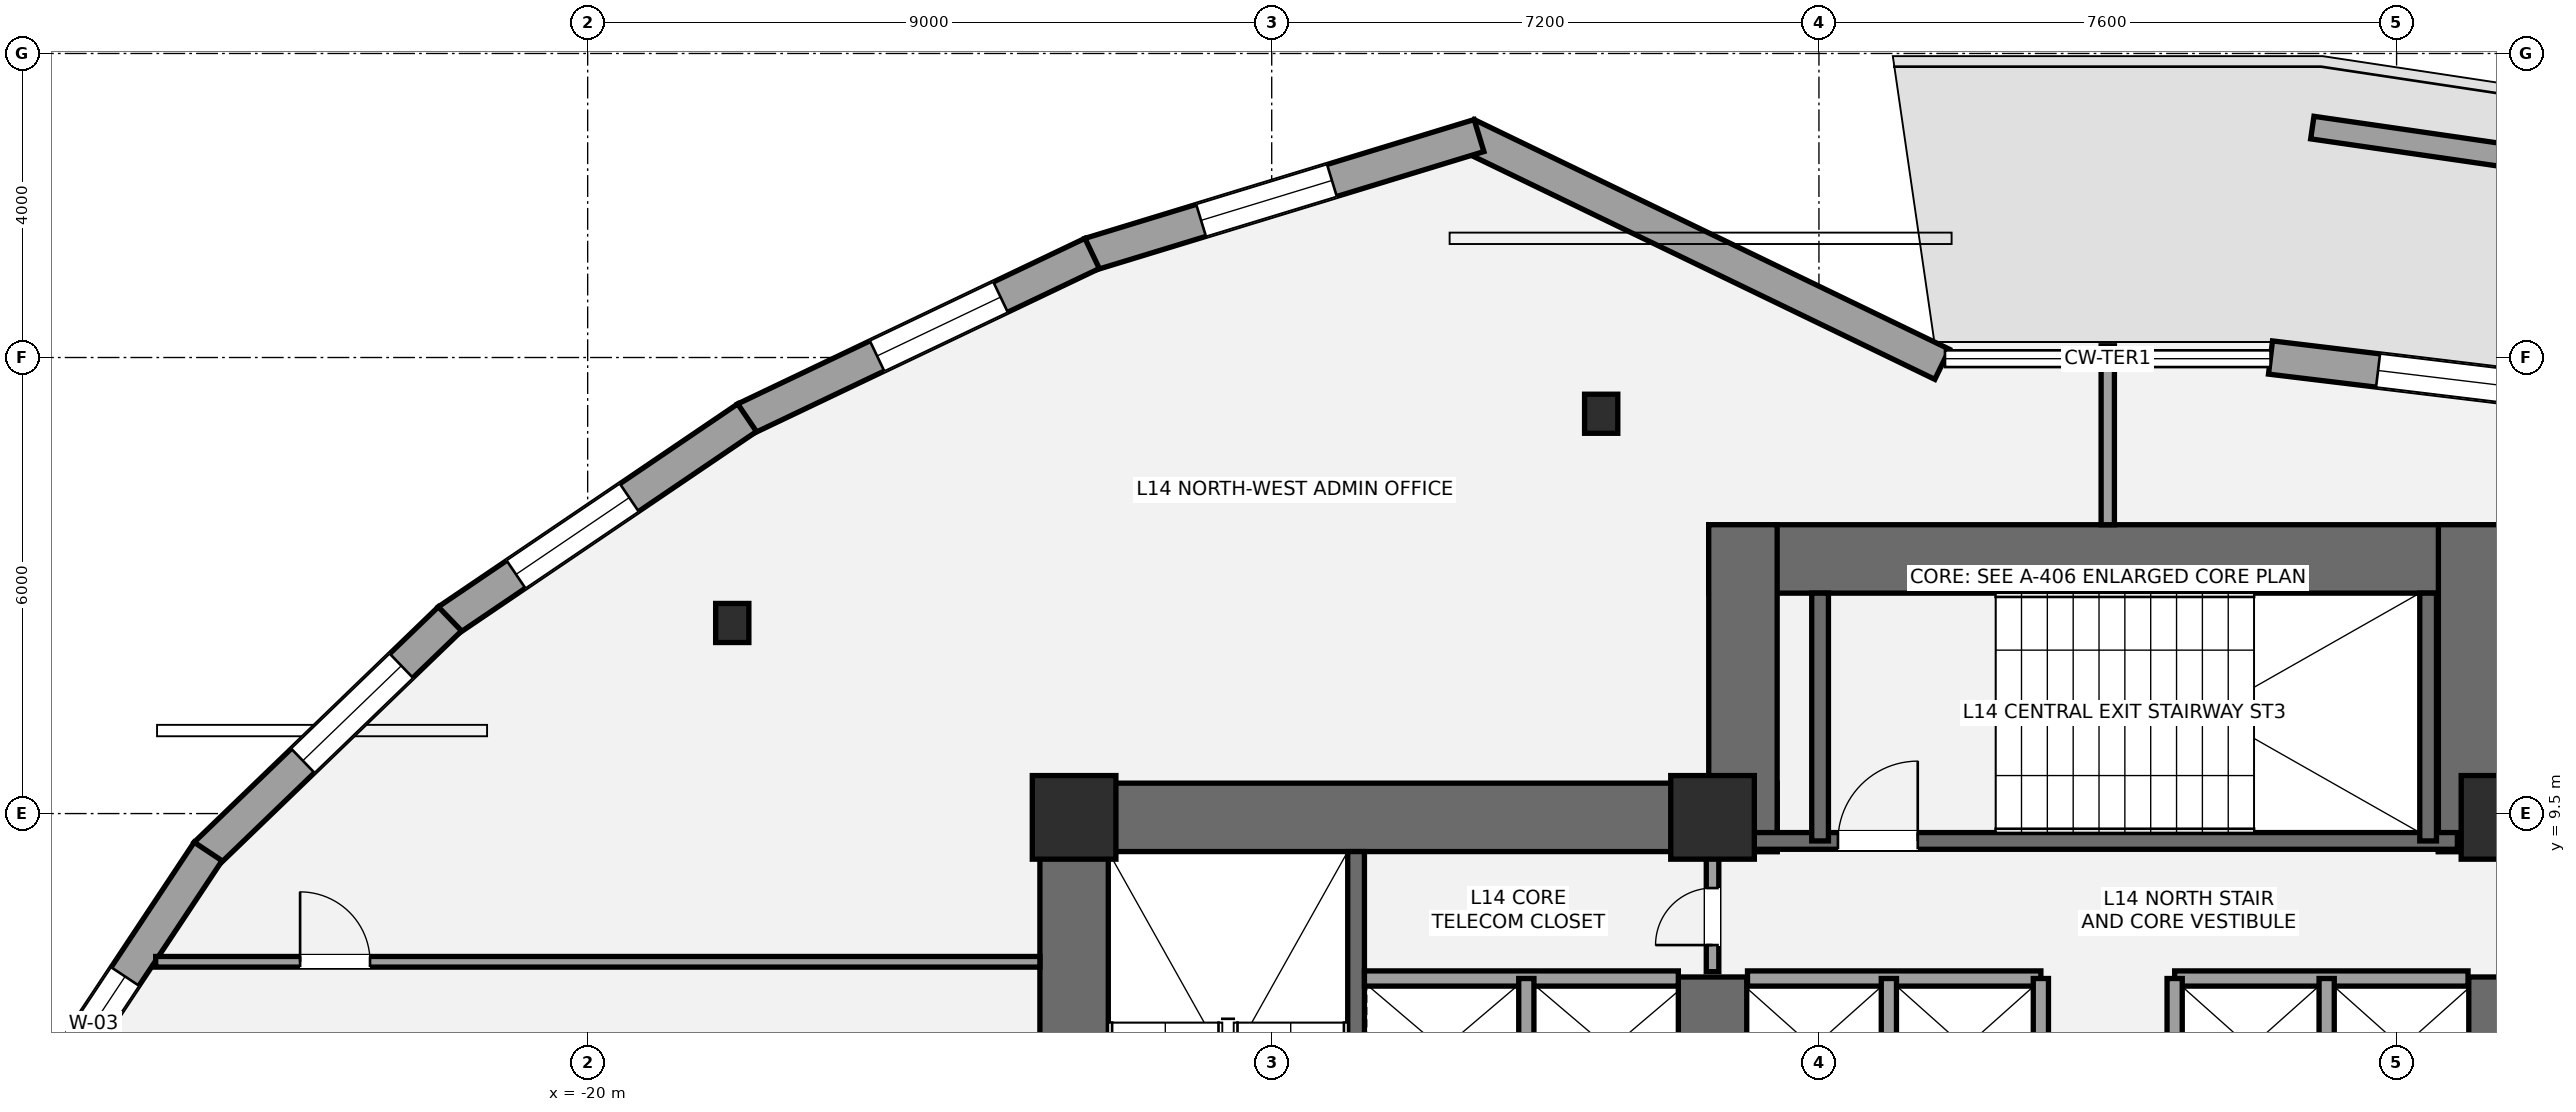
"""IFC4 building model, lengths in metres.
Left out: names, types, materials, properties, quantities, classifications, styles, units other than length and angle.
Written with IfcOpenShell. Run it as: python <this file> out.ifc"""

import sys

from ifc_helpers import new_model, si_unit, direction, frame, frame_2d, origin, origin_2d, place, context, subcontext, project, spatial, rectangle, i_section, extrude, element, fill, save


model = new_model("IFC4")
c1 = context("Model", 3, precision=1e-05, world=origin(), true_north=direction((0.0, 1.0)))
c2 = subcontext(c1, "Body", "Model", "MODEL_VIEW")
j1 = project(units=[si_unit("LENGTHUNIT", "METRE"), si_unit("PLANEANGLEUNIT", "RADIAN")], contexts=[c1])
p1 = place(None, origin())
s1 = spatial("IfcSite", under=j1, at=p1, CompositionType="ELEMENT")
p2 = place(p1, origin())
s2 = spatial("IfcBuilding", under=s1, at=p2, CompositionType="ELEMENT")
p3 = place(p2, frame((0.0, 0.0, 55.8)))
s3 = spatial("IfcBuildingStorey", under=s2, at=p3, CompositionType="ELEMENT", Elevation=55.8)
p4 = place(p3, frame((-13.6, 0.95, 0.0), z_axis=(0.0, 0.0, 1.0), x_axis=(0.0, 1.0, 0.0)))
e1 = element("IfcWall", 1, at=p4, inside=s3, PredefinedType="SHEAR", context=c2, shape_type="SweptSolid", body=[
    extrude(rectangle(XDim=8.95, YDim=0.9, at=frame_2d((4.475, 0.0))), origin(), (0.0, 0.0, 1.0), 3.6),
])
p5 = place(p3, frame((-14.05, 9.45, 0.0), z_axis=(0.0, 0.0, 1.0), x_axis=(1.0, 0.0, 0.0)))
e2 = element("IfcWall", 2, at=p5, inside=s3, PredefinedType="SHEAR", context=c2, shape_type="SweptSolid", body=[
    extrude(rectangle(XDim=9.7, YDim=0.9, at=frame_2d((4.85, 0.0))), origin(), (0.0, 0.0, 1.0), 3.6),
])
p6 = place(p3, frame((-5.2, 5.35, 0.0), z_axis=(0.0, 0.0, 1.0), x_axis=(0.0, 1.0, 0.0)))
e3 = element("IfcWall", 3, at=p6, inside=s3, PredefinedType="SHEAR", context=c2, shape_type="SweptSolid", body=[
    extrude(rectangle(XDim=2.0, YDim=0.9, at=frame_2d((1.0, 0.0))), origin(), (0.0, 0.0, 1.0), 3.6),
])
p7 = place(p3, frame((-9.89, 1.85, 0.0), z_axis=(0.0, 0.0, 1.0), x_axis=(0.0, 1.0, 0.0)))
e4 = element("IfcWall", 4, at=p7, inside=s3, PredefinedType="SHEAR", context=c2, shape_type="SweptSolid", body=[
    extrude(rectangle(XDim=7.15, YDim=0.22, at=frame_2d((3.575, 0.0))), origin(), (0.0, 0.0, 1.0), 3.6),
])
p8 = place(p3, frame((4.35, 9.45, 0.0), z_axis=(0.0, 0.0, 1.0), x_axis=(1.0, 0.0, 0.0)))
e5 = element("IfcWall", 5, at=p8, inside=s3, PredefinedType="SHEAR", context=c2, shape_type="SweptSolid", body=[
    extrude(rectangle(XDim=9.7, YDim=0.9, at=frame_2d((4.85, 0.0))), origin(), (0.0, 0.0, 1.0), 3.6),
])
p9 = place(p3, frame((5.2, 5.35, 0.0), z_axis=(0.0, 0.0, 1.0), x_axis=(0.0, 1.0, 0.0)))
e6 = element("IfcWall", 6, at=p9, inside=s3, PredefinedType="SHEAR", context=c2, shape_type="SweptSolid", body=[
    extrude(rectangle(XDim=2.0, YDim=0.9, at=frame_2d((1.0, 0.0))), origin(), (0.0, 0.0, 1.0), 3.6),
])
p10 = place(p3, frame((-5.25, 12.85, 0.0), z_axis=(0.0, 0.0, 1.0), x_axis=(1.0, 0.0, 0.0)))
e7 = element("IfcWall", 7, at=p10, inside=s3, PredefinedType="SHEAR", context=c2, shape_type="SweptSolid", body=[
    extrude(rectangle(XDim=10.5, YDim=0.9, at=frame_2d((5.25, 0.0))), origin(), (0.0, 0.0, 1.0), 3.6),
])
for number, where, z_axis, x_axis in (
    (8, (-4.8, 9.0, 0.0), (0.0, 0.0, 1.0), (0.0, 1.0, 0.0)),
    (9, (4.8, 9.0, 0.0), (0.0, 0.0, 1.0), (0.0, 1.0, 0.0)),
):
    element("IfcWall", number, at=place(p3, frame(where, z_axis=z_axis, x_axis=x_axis)), inside=s3, PredefinedType="SHEAR", context=c2, shape_type="SweptSolid", body=[
        extrude(rectangle(XDim=4.3, YDim=0.9, at=frame_2d((2.15, 0.0))), origin(), (0.0, 0.0, 1.0), 3.6),
    ])
p11 = place(p3, frame((-4.7, 9.14, 0.0), z_axis=(0.0, 0.0, 1.0), x_axis=(1.0, 0.0, 0.0)))
e10 = element("IfcWall", 10, at=p11, inside=s3, PredefinedType="SHEAR", context=c2, shape_type="SweptSolid", body=[
    extrude(rectangle(XDim=9.3, YDim=0.22, at=frame_2d((4.65, 0.0))), origin(), (0.0, 0.0, 1.0), 3.6),
])
p12 = place(p11, frame((1.15, 0.0, 0.0)))
e11 = element("IfcOpeningElement", 11, at=p12, cuts=e10, PredefinedType="OPENING", context=c2, shape_type="SweptSolid", body=[
    extrude(rectangle(XDim=1.05, YDim=2.15, at=frame_2d((0.525, 1.075))), frame((0.0, 0.12, 0.0), z_axis=(0.0, -1.0, 0.0), x_axis=(1.0, 0.0, 0.0)), (0.0, 0.0, 1.0), 0.24),
])
for number, where, z_axis, x_axis in (
    (12, (-3.785, 9.14, 0.0), (0.0, 0.0, 1.0), (0.0, 1.0, 0.0)),
    (13, (4.215, 9.14, 0.0), (0.0, 0.0, 1.0), (0.0, 1.0, 0.0)),
):
    element("IfcWall", number, at=place(p3, frame(where, z_axis=z_axis, x_axis=x_axis)), inside=s3, PredefinedType="SHEAR", context=c2, shape_type="SweptSolid", body=[
        extrude(rectangle(XDim=3.26, YDim=0.22, at=frame_2d((1.63, 0.0))), origin(), (0.0, 0.0, 1.0), 3.6),
    ])
for number, where, z_axis, x_axis in (
    (14, (-13.6, 9.45, 0.0), (0.0, 0.0, 1.0), (1.0, 0.0, 0.0)),
    (15, (-5.2, 9.45, 0.0), (0.0, 0.0, 1.0), (1.0, 0.0, 0.0)),
    (16, (5.2, 9.45, 0.0), (0.0, 0.0, 1.0), (1.0, 0.0, 0.0)),
):
    element("IfcColumn", number, at=place(p3, frame(where, z_axis=z_axis, x_axis=x_axis)), inside=s3, PredefinedType="COLUMN", context=c2, shape_type="SweptSolid", body=[
        extrude(rectangle(XDim=1.1, YDim=1.1, at=origin_2d()), origin(), (0.0, 0.0, 1.0), 3.6),
    ])
for number, where, z_axis, x_axis in (
    (17, (-6.665, 14.76, 0.0), (0.0, 0.0, 1.0), (1.0, 0.0, 0.0)),
    (18, (-18.098, 12.007, 0.0), (0.0, 0.0, 1.0), (1.0, 0.0, 0.0)),
):
    element("IfcColumn", number, at=place(p3, frame(where, z_axis=z_axis, x_axis=x_axis)), inside=s3, PredefinedType="COLUMN", context=c2, shape_type="SweptSolid", body=[
        extrude(i_section(OverallWidth=0.437, OverallDepth=0.514, WebThickness=0.061, FlangeThickness=0.097, at=origin_2d()), origin(), (0.0, 0.0, 1.0), 3.6),
    ])
p13 = place(p3, frame((2.141, 15.5, 0.0), z_axis=(0.0, 0.0, 1.0), x_axis=(0.992811109043, -0.119691694618, 0.0)))
e19 = element("IfcWall", 19, at=p13, inside=s3, PredefinedType="STANDARD", context=c2, shape_type="SweptSolid", body=[
    extrude(rectangle(XDim=4.651, YDim=0.44, at=frame_2d((2.325, 0.0))), origin(), (0.0, 0.0, 1.0), 2.533),
])
p14 = place(p13, frame((1.425, 0.0, 0.65)))
e20 = element("IfcOpeningElement", 20, at=p14, cuts=e19, PredefinedType="OPENING", context=c2, shape_type="SweptSolid", body=[
    extrude(rectangle(XDim=1.8, YDim=1.7, at=frame_2d((0.9, 0.85))), frame((0.0, 0.23, 0.0), z_axis=(0.0, -1.0, 0.0), x_axis=(1.0, 0.0, 0.0)), (0.0, 0.0, 1.0), 0.46),
])
p15 = place(p3, frame((-8.432, 18.432, 0.0), z_axis=(0.0, 0.0, 1.0), x_axis=(0.900412531656, -0.435037093634, 0.0)))
e21 = element("IfcWall", 21, at=p15, inside=s3, PredefinedType="STANDARD", context=c2, shape_type="SweptSolid", body=[
    extrude(rectangle(XDim=6.945, YDim=0.44, at=frame_2d((3.472, 0.0))), origin(), (0.0, 0.0, 1.0), 2.533),
])
p16 = place(p3, frame((-13.393, 16.857, 0.0), z_axis=(0.0, 0.0, 1.0), x_axis=(0.956466543593, 0.291841996615, 0.0)))
e22 = element("IfcWall", 22, at=p16, inside=s3, PredefinedType="STANDARD", context=c2, shape_type="SweptSolid", body=[
    extrude(rectangle(XDim=5.354, YDim=0.44, at=frame_2d((2.677, 0.0))), origin(), (0.0, 0.0, 1.0), 2.529),
])
p17 = place(p16, frame((1.531, 0.0, 0.65)))
e23 = element("IfcOpeningElement", 23, at=p17, cuts=e22, PredefinedType="OPENING", context=c2, shape_type="SweptSolid", body=[
    extrude(rectangle(XDim=1.8, YDim=1.7, at=frame_2d((0.9, 0.85))), frame((0.0, 0.23, 0.0), z_axis=(0.0, -1.0, 0.0), x_axis=(1.0, 0.0, 0.0)), (0.0, 0.0, 1.0), 0.46),
])
p18 = place(p3, frame((-17.931, 14.691, 0.0), z_axis=(0.0, 0.0, 1.0), x_axis=(0.902682101727, 0.430308056189, 0.0)))
e24 = element("IfcWall", 24, at=p18, inside=s3, PredefinedType="STANDARD", context=c2, shape_type="SweptSolid", body=[
    extrude(rectangle(XDim=5.061, YDim=0.44, at=frame_2d((2.53, 0.0))), origin(), (0.0, 0.0, 1.0), 2.529),
])
p19 = place(p18, frame((1.927, 0.0, 0.65)))
e25 = element("IfcOpeningElement", 25, at=p19, cuts=e24, PredefinedType="OPENING", context=c2, shape_type="SweptSolid", body=[
    extrude(rectangle(XDim=1.8, YDim=1.7, at=frame_2d((0.9, 0.85))), frame((0.0, 0.23, 0.0), z_axis=(0.0, -1.0, 0.0), x_axis=(1.0, 0.0, 0.0)), (0.0, 0.0, 1.0), 0.46),
])
p20 = place(p3, frame((-21.841, 12.038, 0.0), z_axis=(0.0, 0.0, 1.0), x_axis=(0.827723442454, 0.561136260468, 0.0)))
e26 = element("IfcWall", 26, at=p20, inside=s3, PredefinedType="STANDARD", context=c2, shape_type="SweptSolid", body=[
    extrude(rectangle(XDim=4.759, YDim=0.44, at=frame_2d((2.379, 0.0))), origin(), (0.0, 0.0, 1.0), 2.529),
])
p21 = place(p20, frame((1.086, 0.0, 0.65)))
e27 = element("IfcOpeningElement", 27, at=p21, cuts=e26, PredefinedType="OPENING", context=c2, shape_type="SweptSolid", body=[
    extrude(rectangle(XDim=1.8, YDim=1.7, at=frame_2d((0.9, 0.85))), frame((0.0, 0.23, 0.0), z_axis=(0.0, -1.0, 0.0), x_axis=(1.0, 0.0, 0.0)), (0.0, 0.0, 1.0), 0.46),
])
p22 = place(p3, frame((-25.024, 8.964, 0.0), z_axis=(0.0, 0.0, 1.0), x_axis=(0.719928259859, 0.694048485811, 0.0)))
e28 = element("IfcWall", 28, at=p22, inside=s3, PredefinedType="STANDARD", context=c2, shape_type="SweptSolid", body=[
    extrude(rectangle(XDim=4.462, YDim=0.44, at=frame_2d((2.231, 0.0))), origin(), (0.0, 0.0, 1.0), 2.529),
])
p23 = place(p22, frame((1.774, 0.0, 0.65)))
e29 = element("IfcOpeningElement", 29, at=p23, cuts=e28, PredefinedType="OPENING", context=c2, shape_type="SweptSolid", body=[
    extrude(rectangle(XDim=1.8, YDim=1.7, at=frame_2d((0.9, 0.85))), frame((0.0, 0.23, 0.0), z_axis=(0.0, -1.0, 0.0), x_axis=(1.0, 0.0, 0.0)), (0.0, 0.0, 1.0), 0.46),
])
p24 = place(p3, frame((-27.299, 5.53, 0.0), z_axis=(0.0, 0.0, 1.0), x_axis=(0.553144350008, 0.833085426625, 0.0)))
e30 = element("IfcWall", 30, at=p24, inside=s3, PredefinedType="STANDARD", context=c2, shape_type="SweptSolid", body=[
    extrude(rectangle(XDim=4.167, YDim=0.44, at=frame_2d((2.083, 0.0))), origin(), (0.0, 0.0, 1.0), 2.529),
])
p25 = place(p24, frame((0.693, 0.0, 0.65)))
e31 = element("IfcOpeningElement", 31, at=p25, cuts=e30, PredefinedType="OPENING", context=c2, shape_type="SweptSolid", body=[
    extrude(rectangle(XDim=1.5, YDim=1.7, at=frame_2d((0.75, 0.85))), frame((0.0, 0.23, 0.0), z_axis=(0.0, -1.0, 0.0), x_axis=(1.0, 0.0, 0.0)), (0.0, 0.0, 1.0), 0.46),
])
p26 = place(p3, frame((7.948, 17.763, 0.0), z_axis=(0.0, 0.0, 1.0), x_axis=(-0.989658802498, 0.143441467636, 0.0)))
e32 = element("IfcWall", 32, at=p26, inside=s3, PredefinedType="PARAPET", context=c2, shape_type="SweptSolid", body=[
    extrude(rectangle(XDim=5.312, YDim=0.3, at=frame_2d((2.656, 0.0))), origin(), (0.0, 0.0, 1.0), 0.45),
])
p27 = place(p3, frame((-9.78, 7.33, 0.0), z_axis=(0.0, 0.0, 1.0), x_axis=(1.0, 0.0, 0.0)))
e33 = element("IfcWall", 33, at=p27, inside=s3, PredefinedType="SOLIDWALL", context=c2, shape_type="SweptSolid", body=[
    extrude(rectangle(XDim=4.13, YDim=0.2, at=frame_2d((2.065, 0.0))), origin(), (0.0, 0.0, 1.0), 3.4),
])
p28 = place(p3, frame((-7.65, 5.47, 0.0), z_axis=(0.0, 0.0, 1.0), x_axis=(0.0, 1.0, 0.0)))
e34 = element("IfcWall", 34, at=p28, inside=s3, PredefinedType="SOLIDWALL", context=c2, shape_type="SweptSolid", body=[
    extrude(rectangle(XDim=1.86, YDim=0.2, at=frame_2d((0.93, 0.0))), origin(), (0.0, 0.0, 1.0), 3.4),
])
for number, where, z_axis, x_axis in (
    (35, (-4.74, 7.33, 0.0), (0.0, 0.0, 1.0), (1.0, 0.0, 0.0)),
    (36, (0.88, 7.33, 0.0), (0.0, 0.0, 1.0), (1.0, 0.0, 0.0)),
):
    element("IfcWall", number, at=place(p3, frame(where, z_axis=z_axis, x_axis=x_axis)), inside=s3, PredefinedType="SOLIDWALL", context=c2, shape_type="SweptSolid", body=[
        extrude(rectangle(XDim=3.86, YDim=0.2, at=frame_2d((1.93, 0.0))), origin(), (0.0, 0.0, 1.0), 3.4),
    ])
for number, where, z_axis, x_axis in (
    (37, (-2.88, 5.52, 0.0), (0.0, 0.0, 1.0), (0.0, 1.0, 0.0)),
    (38, (2.88, 5.52, 0.0), (0.0, 0.0, 1.0), (0.0, 1.0, 0.0)),
    (39, (-0.88, 5.52, 0.0), (0.0, 0.0, 1.0), (0.0, 1.0, 0.0)),
    (40, (0.88, 5.52, 0.0), (0.0, 0.0, 1.0), (0.0, 1.0, 0.0)),
):
    element("IfcWall", number, at=place(p3, frame(where, z_axis=z_axis, x_axis=x_axis)), inside=s3, PredefinedType="SOLIDWALL", context=c2, shape_type="SweptSolid", body=[
        extrude(rectangle(XDim=1.81, YDim=0.2, at=frame_2d((0.905, 0.0))), origin(), (0.0, 0.0, 1.0), 3.4),
    ])
p29 = place(p3, frame((-5.2, 7.42, 0.0), z_axis=(0.0, 0.0, 1.0), x_axis=(0.0, 1.0, 0.0)))
e41 = element("IfcWall", 41, at=p29, inside=s3, PredefinedType="PARTITIONING", context=c2, shape_type="SweptSolid", body=[
    extrude(rectangle(XDim=1.58, YDim=0.165, at=frame_2d((0.79, 0.0))), origin(), (0.0, 0.0, 1.0), 3.4),
])
p30 = place(p29, frame((0.35, 0.0, 0.0)))
e42 = element("IfcOpeningElement", 42, at=p30, cuts=e41, PredefinedType="OPENING", context=c2, shape_type="SweptSolid", body=[
    extrude(rectangle(XDim=0.75, YDim=2.1, at=frame_2d((0.375, 1.05))), frame((0.0, 0.093, 0.0), z_axis=(0.0, -1.0, 0.0), x_axis=(1.0, 0.0, 0.0)), (0.0, 0.0, 1.0), 0.185),
])
p31 = place(p3, frame((-25.684, 7.55, 0.0), z_axis=(0.0, 0.0, 1.0), x_axis=(1.0, 0.0, 0.0)))
e43 = element("IfcWall", 43, at=p31, inside=s3, PredefinedType="PARTITIONING", context=c2, shape_type="SweptSolid", body=[
    extrude(rectangle(XDim=11.634, YDim=0.14, at=frame_2d((5.817, 0.0))), origin(), (0.0, 0.0, 1.0), 2.853),
])
p32 = place(p31, frame((1.9, 0.0, 0.0)))
e44 = element("IfcOpeningElement", 44, at=p32, cuts=e43, PredefinedType="OPENING", context=c2, shape_type="SweptSolid", body=[
    extrude(rectangle(XDim=0.92, YDim=2.15, at=frame_2d((0.46, 1.075))), frame((0.0, 0.08, 0.0), z_axis=(0.0, -1.0, 0.0), x_axis=(1.0, 0.0, 0.0)), (0.0, 0.0, 1.0), 0.16),
])
p33 = place(p3, frame((0.0, 13.3, 0.0), z_axis=(0.0, 0.0, 1.0), x_axis=(0.0, 1.0, 0.0)))
e45 = element("IfcWall", 45, at=p33, inside=s3, PredefinedType="PARTITIONING", context=c2, shape_type="SweptSolid", body=[
    extrude(rectangle(XDim=2.354, YDim=0.175, at=frame_2d((1.177, 0.0))), origin(), (0.0, 0.0, 1.0), 3.4),
])
p34 = place(p14, origin())
e46 = element("IfcWindow", 46, at=p34, inside=s3, PartitioningType="SINGLE_PANEL", PredefinedType="WINDOW", context=c2, shape_type="SweptSolid", body=[
    extrude(rectangle(XDim=1.8, YDim=1.7, at=frame_2d((0.9, 0.85))), frame((0.0, -0.01, 0.0), z_axis=(0.0, -1.0, 0.0), x_axis=(1.0, 0.0, 0.0)), (0.0, 0.0, 1.0), 0.06),
])
fill(e20, e46)
p35 = place(p17, origin())
e47 = element("IfcWindow", 47, at=p35, inside=s3, PartitioningType="SINGLE_PANEL", PredefinedType="WINDOW", context=c2, shape_type="SweptSolid", body=[
    extrude(rectangle(XDim=1.8, YDim=1.7, at=frame_2d((0.9, 0.85))), frame((0.0, -0.01, 0.0), z_axis=(0.0, -1.0, 0.0), x_axis=(1.0, 0.0, 0.0)), (0.0, 0.0, 1.0), 0.06),
])
fill(e23, e47)
p36 = place(p19, origin())
e48 = element("IfcWindow", 48, at=p36, inside=s3, PartitioningType="SINGLE_PANEL", PredefinedType="WINDOW", context=c2, shape_type="SweptSolid", body=[
    extrude(rectangle(XDim=1.8, YDim=1.7, at=frame_2d((0.9, 0.85))), frame((0.0, -0.01, 0.0), z_axis=(0.0, -1.0, 0.0), x_axis=(1.0, 0.0, 0.0)), (0.0, 0.0, 1.0), 0.06),
])
fill(e25, e48)
p37 = place(p21, origin())
e49 = element("IfcWindow", 49, at=p37, inside=s3, PartitioningType="SINGLE_PANEL", PredefinedType="WINDOW", context=c2, shape_type="SweptSolid", body=[
    extrude(rectangle(XDim=1.8, YDim=1.7, at=frame_2d((0.9, 0.85))), frame((0.0, -0.01, 0.0), z_axis=(0.0, -1.0, 0.0), x_axis=(1.0, 0.0, 0.0)), (0.0, 0.0, 1.0), 0.06),
])
fill(e27, e49)
p38 = place(p23, origin())
e50 = element("IfcWindow", 50, at=p38, inside=s3, PartitioningType="SINGLE_PANEL", PredefinedType="WINDOW", context=c2, shape_type="SweptSolid", body=[
    extrude(rectangle(XDim=1.8, YDim=1.7, at=frame_2d((0.9, 0.85))), frame((0.0, -0.01, 0.0), z_axis=(0.0, -1.0, 0.0), x_axis=(1.0, 0.0, 0.0)), (0.0, 0.0, 1.0), 0.06),
])
fill(e29, e50)
p39 = place(p25, origin())
e51 = element("IfcWindow", 51, at=p39, inside=s3, PartitioningType="SINGLE_PANEL", PredefinedType="WINDOW", context=c2, shape_type="SweptSolid", body=[
    extrude(rectangle(XDim=1.5, YDim=1.7, at=frame_2d((0.75, 0.85))), frame((0.0, -0.01, 0.0), z_axis=(0.0, -1.0, 0.0), x_axis=(1.0, 0.0, 0.0)), (0.0, 0.0, 1.0), 0.06),
])
fill(e31, e51)
p40 = place(p12, origin())
e52 = element("IfcDoor", 52, at=p40, inside=s3, OperationType="SINGLE_SWING_RIGHT", PredefinedType="DOOR", context=c2, shape_type="SweptSolid", body=[
    extrude(rectangle(XDim=1.05, YDim=2.15, at=frame_2d((0.525, 1.075))), frame((0.0, 0.025, 0.0), z_axis=(0.0, -1.0, 0.0), x_axis=(1.0, 0.0, 0.0)), (0.0, 0.0, 1.0), 0.05),
])
fill(e11, e52)
p41 = place(p30, origin())
e53 = element("IfcDoor", 53, at=p41, inside=s3, OperationType="SINGLE_SWING_LEFT", PredefinedType="DOOR", context=c2, shape_type="SweptSolid", body=[
    extrude(rectangle(XDim=0.75, YDim=2.1, at=frame_2d((0.375, 1.05))), frame((0.0, 0.025, 0.0), z_axis=(0.0, -1.0, 0.0), x_axis=(1.0, 0.0, 0.0)), (0.0, 0.0, 1.0), 0.05),
])
fill(e42, e53)
p42 = place(p32, origin())
e54 = element("IfcDoor", 54, at=p42, inside=s3, OperationType="SINGLE_SWING_LEFT", PredefinedType="DOOR", context=c2, shape_type="SweptSolid", body=[
    extrude(rectangle(XDim=0.92, YDim=2.15, at=frame_2d((0.46, 1.075))), frame((0.0, 0.025, 0.0), z_axis=(0.0, -1.0, 0.0), x_axis=(1.0, 0.0, 0.0)), (0.0, 0.0, 1.0), 0.05),
])
fill(e44, e54)
save(model, sys.argv[1])
